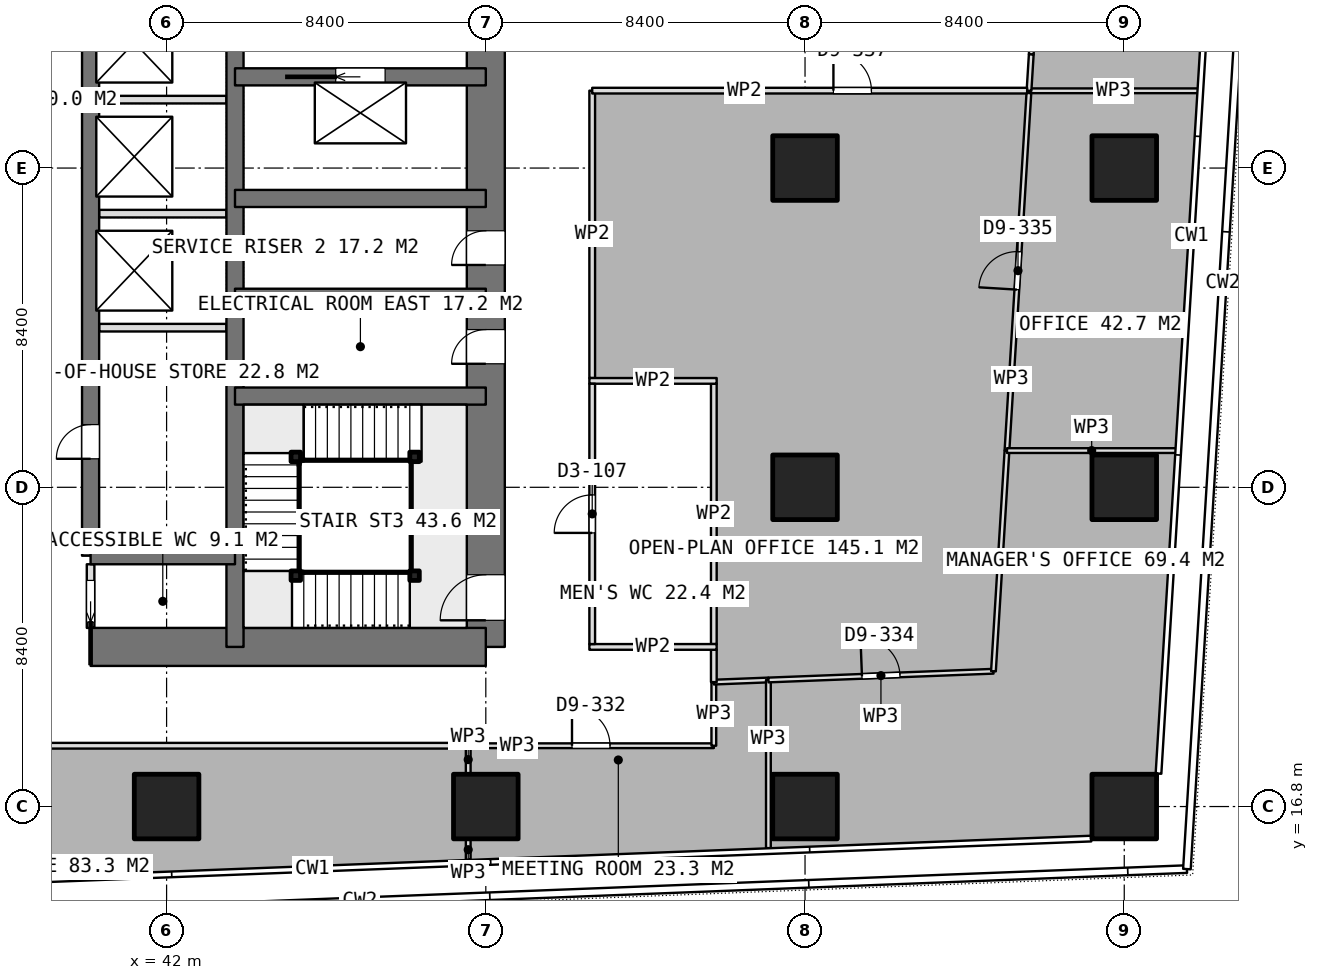
"""IFC4 building model, lengths in metres.
Left out: names, types, materials, properties, quantities, classifications, styles, units other than length and angle.
Written with IfcOpenShell. Run it as: python <this file> out.ifc"""

import sys

from ifc_helpers import new_model, si_unit, direction, frame, frame_2d, origin, origin_2d, place, context, subcontext, project, spatial, rectangle, extrude, element, fill, save


model = new_model("IFC4")
c1 = context("Model", 3, precision=1e-05, world=origin(), true_north=direction((0.0, 1.0)))
c2 = subcontext(c1, "Body", "Model", "MODEL_VIEW")
j1 = project(units=[si_unit("LENGTHUNIT", "METRE"), si_unit("PLANEANGLEUNIT", "RADIAN")], contexts=[c1])
p1 = place(None, origin())
s1 = spatial("IfcSite", under=j1, at=p1, CompositionType="ELEMENT")
p2 = place(p1, origin())
s2 = spatial("IfcBuilding", under=s1, at=p2, CompositionType="ELEMENT")
p3 = place(p2, frame((0.0, 0.0, 102.8)))
s3 = spatial("IfcBuildingStorey", under=s2, at=p3, CompositionType="ELEMENT", Elevation=102.8)
p4 = place(p3, frame((40.0, 21.0, 0.0), z_axis=(0.0, 0.0, 1.0), x_axis=(1.0, 0.0, 0.0)))
e1 = element("IfcWall", 1, at=p4, inside=s3, PredefinedType="SHEAR", context=c2, shape_type="SweptSolid", body=[
    extrude(rectangle(XDim=10.4, YDim=1.0, at=frame_2d((5.2, 0.0))), origin(), (0.0, 0.0, 1.0), 3.75),
])
p5 = place(p3, frame((50.4, 21.0, 0.0), z_axis=(0.0, 0.0, 1.0), x_axis=(0.0, 1.0, 0.0)))
e2 = element("IfcWall", 2, at=p5, inside=s3, PredefinedType="SHEAR", context=c2, shape_type="SweptSolid", body=[
    extrude(rectangle(XDim=25.2, YDim=1.0, at=frame_2d((12.6, 0.0))), origin(), (0.0, 0.0, 1.0), 3.75),
])
p6 = place(p5, frame((16.2, 0.0, 0.0)))
e3 = element("IfcOpeningElement", 3, at=p6, cuts=e2, PredefinedType="OPENING", context=c2, shape_type="SweptSolid", body=[
    extrude(rectangle(XDim=1.2, YDim=2.1, at=frame_2d((0.6, 1.05))), frame((0.0, 0.51, 0.0), z_axis=(0.0, -1.0, 0.0), x_axis=(1.0, 0.0, 0.0)), (0.0, 0.0, 1.0), 1.02),
])
p7 = place(p5, frame((10.05, 0.0, 0.0)))
e4 = element("IfcOpeningElement", 4, at=p7, cuts=e2, PredefinedType="OPENING", context=c2, shape_type="SweptSolid", body=[
    extrude(rectangle(XDim=0.9, YDim=2.1, at=frame_2d((0.45, 1.05))), frame((0.0, 0.51, 0.0), z_axis=(0.0, -1.0, 0.0), x_axis=(1.0, 0.0, 0.0)), (0.0, 0.0, 1.0), 1.02),
])
p8 = place(p5, frame((7.45, 0.0, 0.0)))
e5 = element("IfcOpeningElement", 5, at=p8, cuts=e2, PredefinedType="OPENING", context=c2, shape_type="SweptSolid", body=[
    extrude(rectangle(XDim=0.9, YDim=2.1, at=frame_2d((0.45, 1.05))), frame((0.0, 0.51, 0.0), z_axis=(0.0, -1.0, 0.0), x_axis=(1.0, 0.0, 0.0)), (0.0, 0.0, 1.0), 1.02),
])
p9 = place(p5, frame((0.7, 0.0, 0.0)))
e6 = element("IfcOpeningElement", 6, at=p9, cuts=e2, PredefinedType="OPENING", context=c2, shape_type="SweptSolid", body=[
    extrude(rectangle(XDim=1.2, YDim=2.1, at=frame_2d((0.6, 1.05))), frame((0.0, 0.51, 0.0), z_axis=(0.0, -1.0, 0.0), x_axis=(1.0, 0.0, 0.0)), (0.0, 0.0, 1.0), 1.02),
])
p10 = place(p3, frame((43.8, 21.0, 0.0), z_axis=(0.0, 0.0, 1.0), x_axis=(0.0, 1.0, 0.0)))
e7 = element("IfcWall", 7, at=p10, inside=s3, PredefinedType="SHEAR", context=c2, shape_type="SweptSolid", body=[
    extrude(rectangle(XDim=25.2, YDim=0.45, at=frame_2d((12.6, 0.0))), origin(), (0.0, 0.0, 1.0), 3.75),
])
p11 = place(p3, frame((40.0, 23.4, 0.0), z_axis=(0.0, 0.0, 1.0), x_axis=(0.0, 1.0, 0.0)))
e8 = element("IfcWall", 8, at=p11, inside=s3, PredefinedType="SHEAR", context=c2, shape_type="SweptSolid", body=[
    extrude(rectangle(XDim=18.0, YDim=0.45, at=frame_2d((9.0, 0.0))), origin(), (0.0, 0.0, 1.0), 3.75),
])
p12 = place(p11, frame((2.55, 0.0, 0.0)))
e9 = element("IfcOpeningElement", 9, at=p12, cuts=e8, PredefinedType="OPENING", context=c2, shape_type="SweptSolid", body=[
    extrude(rectangle(XDim=0.9, YDim=2.1, at=frame_2d((0.45, 1.05))), frame((0.0, 0.235, 0.0), z_axis=(0.0, -1.0, 0.0), x_axis=(1.0, 0.0, 0.0)), (0.0, 0.0, 1.0), 0.47),
])
p13 = place(p3, frame((40.0, 23.4, 0.0), z_axis=(0.0, 0.0, 1.0), x_axis=(1.0, 0.0, 0.0)))
e10 = element("IfcWall", 10, at=p13, inside=s3, PredefinedType="SHEAR", context=c2, shape_type="SweptSolid", body=[
    extrude(rectangle(XDim=3.8, YDim=0.45, at=frame_2d((1.9, 0.0))), origin(), (0.0, 0.0, 1.0), 3.75),
])
for number, where, z_axis, x_axis in (
    (11, (43.8, 27.6, 0.0), (0.0, 0.0, 1.0), (1.0, 0.0, 0.0)),
    (12, (43.8, 30.2, 0.0), (0.0, 0.0, 1.0), (1.0, 0.0, 0.0)),
    (13, (43.8, 32.8, 0.0), (0.0, 0.0, 1.0), (1.0, 0.0, 0.0)),
):
    element("IfcWall", number, at=place(p3, frame(where, z_axis=z_axis, x_axis=x_axis)), inside=s3, PredefinedType="SHEAR", context=c2, shape_type="SweptSolid", body=[
        extrude(rectangle(XDim=6.6, YDim=0.45, at=frame_2d((3.3, 0.0))), origin(), (0.0, 0.0, 1.0), 3.75),
    ])
p14 = place(p3, frame((43.8, 36.0, 0.0), z_axis=(0.0, 0.0, 1.0), x_axis=(1.0, 0.0, 0.0)))
e14 = element("IfcWall", 14, at=p14, inside=s3, PredefinedType="SHEAR", context=c2, shape_type="SweptSolid", body=[
    extrude(rectangle(XDim=6.6, YDim=0.45, at=frame_2d((3.3, 0.0))), origin(), (0.0, 0.0, 1.0), 3.75),
])
p15 = place(p14, frame((2.65, 0.0, 0.0)))
e15 = element("IfcOpeningElement", 15, at=p15, cuts=e14, PredefinedType="OPENING", context=c2, shape_type="SweptSolid", body=[
    extrude(rectangle(XDim=1.3, YDim=2.1, at=frame_2d((0.65, 1.05))), frame((0.0, 0.235, 0.0), z_axis=(0.0, -1.0, 0.0), x_axis=(1.0, 0.0, 0.0)), (0.0, 0.0, 1.0), 0.47),
])
for number, where, z_axis, x_axis in (
    (16, (42.0, 16.8, 0.0), (0.0, 0.0, 1.0), (1.0, 0.0, 0.0)),
    (17, (50.4, 16.8, 0.0), (0.0, 0.0, 1.0), (1.0, 0.0, 0.0)),
    (18, (58.8, 16.8, 0.0), (0.0, 0.0, 1.0), (1.0, 0.0, 0.0)),
    (19, (58.8, 25.2, 0.0), (0.0, 0.0, 1.0), (1.0, 0.0, 0.0)),
    (20, (58.8, 33.6, 0.0), (0.0, 0.0, 1.0), (1.0, 0.0, 0.0)),
    (21, (67.2, 16.8, 0.0), (0.0, 0.0, 1.0), (1.0, 0.0, 0.0)),
    (22, (67.2, 25.2, 0.0), (0.0, 0.0, 1.0), (1.0, 0.0, 0.0)),
    (23, (67.2, 33.6, 0.0), (0.0, 0.0, 1.0), (1.0, 0.0, 0.0)),
):
    element("IfcColumn", number, at=place(p3, frame(where, z_axis=z_axis, x_axis=x_axis)), inside=s3, PredefinedType="COLUMN", context=c2, shape_type="SweptSolid", body=[
        extrude(rectangle(XDim=1.7, YDim=1.7, at=origin_2d()), origin(), (0.0, 0.0, 1.0), 3.75),
    ])
for number, where, z_axis, x_axis in (
    (24, (40.225, 29.4, 0.0), (0.0, 0.0, 1.0), (1.0, 0.0, 0.0)),
    (25, (40.225, 32.4, 0.0), (0.0, 0.0, 1.0), (1.0, 0.0, 0.0)),
    (26, (40.225, 35.4, 0.0), (0.0, 0.0, 1.0), (1.0, 0.0, 0.0)),
):
    element("IfcWall", number, at=place(p3, frame(where, z_axis=z_axis, x_axis=x_axis)), inside=s3, PredefinedType="PARTITIONING", context=c2, shape_type="SweptSolid", body=[
        extrude(rectangle(XDim=3.35, YDim=0.2, at=frame_2d((1.675, 0.0))), origin(), (0.0, 0.0, 1.0), 3.5),
    ])
p16 = place(p3, frame((40.0, 21.5, 0.0), z_axis=(0.0, 0.0, 1.0), x_axis=(0.0, 1.0, 0.0)))
e27 = element("IfcWall", 27, at=p16, inside=s3, PredefinedType="PARTITIONING", context=c2, shape_type="SweptSolid", body=[
    extrude(rectangle(XDim=1.675, YDim=0.2, at=frame_2d((0.837, 0.0))), origin(), (0.0, 0.0, 1.0), 3.5),
])
p17 = place(p16, frame((0.15, 0.0, 0.0)))
e28 = element("IfcOpeningElement", 28, at=p17, cuts=e27, PredefinedType="OPENING", context=c2, shape_type="SweptSolid", body=[
    extrude(rectangle(XDim=1.1, YDim=2.1, at=frame_2d((0.55, 1.05))), frame((0.0, 0.11, 0.0), z_axis=(0.0, -1.0, 0.0), x_axis=(1.0, 0.0, 0.0)), (0.0, 0.0, 1.0), 0.22),
])
for number, where, z_axis, x_axis in (
    (29, (53.125, 21.0, 0.0), (0.0, 0.0, 1.0), (1.0, 0.0, 0.0)),
    (30, (53.125, 28.0, 0.0), (0.0, 0.0, 1.0), (1.0, 0.0, 0.0)),
):
    element("IfcWall", number, at=place(p3, frame(where, z_axis=z_axis, x_axis=x_axis)), inside=s3, PredefinedType="PARTITIONING", context=c2, shape_type="SweptSolid", body=[
        extrude(rectangle(XDim=3.35, YDim=0.15, at=frame_2d((1.675, 0.0))), origin(), (0.0, 0.0, 1.0), 3.5),
    ])
p18 = place(p3, frame((53.2, 21.075, 0.0), z_axis=(0.0, 0.0, 1.0), x_axis=(0.0, 1.0, 0.0)))
e31 = element("IfcWall", 31, at=p18, inside=s3, PredefinedType="PARTITIONING", context=c2, shape_type="SweptSolid", body=[
    extrude(rectangle(XDim=6.85, YDim=0.15, at=frame_2d((3.425, 0.0))), origin(), (0.0, 0.0, 1.0), 3.5),
])
p19 = place(p18, frame((2.925, 0.0, 0.0)))
e32 = element("IfcOpeningElement", 32, at=p19, cuts=e31, PredefinedType="OPENING", context=c2, shape_type="SweptSolid", body=[
    extrude(rectangle(XDim=1.0, YDim=2.1, at=frame_2d((0.5, 1.05))), frame((0.0, 0.085, 0.0), z_axis=(0.0, -1.0, 0.0), x_axis=(1.0, 0.0, 0.0)), (0.0, 0.0, 1.0), 0.17),
])
p20 = place(p3, frame((56.4, 21.075, 0.0), z_axis=(0.0, 0.0, 1.0), x_axis=(0.0, 1.0, 0.0)))
e33 = element("IfcWall", 33, at=p20, inside=s3, PredefinedType="PARTITIONING", context=c2, shape_type="SweptSolid", body=[
    extrude(rectangle(XDim=6.85, YDim=0.15, at=frame_2d((3.425, 0.0))), origin(), (0.0, 0.0, 1.0), 3.5),
])
p21 = place(p3, frame((49.937, 18.4, 0.0), z_axis=(0.0, 0.0, 1.0), x_axis=(1.0, 0.0, 0.0)))
e34 = element("IfcWall", 34, at=p21, inside=s3, PredefinedType="PARTITIONING", context=c2, shape_type="SweptSolid", body=[
    extrude(rectangle(XDim=6.463, YDim=0.125, at=frame_2d((3.231, 0.0))), origin(), (0.0, 0.0, 1.0), 3.5),
])
p22 = place(p21, frame((2.731, 0.0, 0.0)))
e35 = element("IfcOpeningElement", 35, at=p22, cuts=e34, PredefinedType="OPENING", context=c2, shape_type="SweptSolid", body=[
    extrude(rectangle(XDim=1.0, YDim=2.1, at=frame_2d((0.5, 1.05))), frame((0.0, 0.073, 0.0), z_axis=(0.0, -1.0, 0.0), x_axis=(1.0, 0.0, 0.0)), (0.0, 0.0, 1.0), 0.145),
])
p23 = place(p3, frame((56.4, 18.4, 0.0), z_axis=(0.0, 0.0, 1.0), x_axis=(0.0, 1.0, 0.0)))
e36 = element("IfcWall", 36, at=p23, inside=s3, PredefinedType="PARTITIONING", context=c2, shape_type="SweptSolid", body=[
    extrude(rectangle(XDim=1.674, YDim=0.125, at=frame_2d((0.837, 0.0))), origin(), (0.0, 0.0, 1.0), 3.5),
])
p24 = place(p3, frame((56.4, 20.074, 0.0), z_axis=(0.0, 0.0, 1.0), x_axis=(0.999242997058, 0.038902864047, 0.0)))
e37 = element("IfcWall", 37, at=p24, inside=s3, PredefinedType="PARTITIONING", context=c2, shape_type="SweptSolid", body=[
    extrude(rectangle(XDim=1.437, YDim=0.125, at=frame_2d((0.719, 0.0))), origin(), (0.0, 0.0, 1.0), 3.5),
])
p25 = place(p3, frame((57.836, 20.13, 0.0), z_axis=(0.0, 0.0, 1.0), x_axis=(0.0, -1.0, 0.0)))
e38 = element("IfcWall", 38, at=p25, inside=s3, PredefinedType="PARTITIONING", context=c2, shape_type="SweptSolid", body=[
    extrude(rectangle(XDim=4.424, YDim=0.125, at=frame_2d((2.212, 0.0))), origin(), (0.0, 0.0, 1.0), 3.5),
])
p26 = place(p3, frame((49.937, 15.399, 0.0), z_axis=(0.0, 0.0, 1.0), x_axis=(0.0, 1.0, 0.0)))
e39 = element("IfcWall", 39, at=p26, inside=s3, PredefinedType="PARTITIONING", context=c2, shape_type="SweptSolid", body=[
    extrude(rectangle(XDim=0.531, YDim=0.125, at=frame_2d((0.266, 0.0))), origin(), (0.0, 0.0, 1.0), 3.5),
])
p27 = place(p3, frame((49.937, 17.67, 0.0), z_axis=(0.0, 0.0, 1.0), x_axis=(0.0, 1.0, 0.0)))
e40 = element("IfcWall", 40, at=p27, inside=s3, PredefinedType="PARTITIONING", context=c2, shape_type="SweptSolid", body=[
    extrude(rectangle(XDim=0.73, YDim=0.125, at=frame_2d((0.365, 0.0))), origin(), (0.0, 0.0, 1.0), 3.5),
])
p28 = place(p3, frame((57.837, 20.13, 0.0), z_axis=(0.0, 0.0, 1.0), x_axis=(0.999244959279, 0.038852430487, 0.0)))
e41 = element("IfcWall", 41, at=p28, inside=s3, PredefinedType="PARTITIONING", context=c2, shape_type="SweptSolid", body=[
    extrude(rectangle(XDim=5.926, YDim=0.125, at=frame_2d((2.963, 0.0))), origin(), (0.0, 0.0, 1.0), 3.5),
])
p29 = place(p28, frame((2.463, 0.0, 0.0)))
e42 = element("IfcOpeningElement", 42, at=p29, cuts=e41, PredefinedType="OPENING", context=c2, shape_type="SweptSolid", body=[
    extrude(rectangle(XDim=1.0, YDim=2.1, at=frame_2d((0.5, 1.05))), frame((0.0, 0.073, 0.0), z_axis=(0.0, -1.0, 0.0), x_axis=(1.0, 0.0, 0.0)), (0.0, 0.0, 1.0), 0.145),
])
p30 = place(p3, frame((63.758, 20.36, 0.0), z_axis=(0.0, 0.0, 1.0), x_axis=(0.06119454608, 0.99812585756, 0.0)))
e43 = element("IfcWall", 43, at=p30, inside=s3, PredefinedType="PARTITIONING", context=c2, shape_type="SweptSolid", body=[
    extrude(rectangle(XDim=5.817, YDim=0.125, at=frame_2d((2.908, 0.0))), origin(), (0.0, 0.0, 1.0), 3.5),
])
p31 = place(p3, frame((64.114, 26.166, 0.0), z_axis=(0.0, 0.0, 1.0), x_axis=(1.0, 0.0, 0.0)))
e44 = element("IfcWall", 44, at=p31, inside=s3, PredefinedType="PARTITIONING", context=c2, shape_type="SweptSolid", body=[
    extrude(rectangle(XDim=4.458, YDim=0.125, at=frame_2d((2.229, 0.0))), origin(), (0.0, 0.0, 1.0), 3.5),
])
p32 = place(p3, frame((64.114, 26.167, 0.0), z_axis=(0.0, 0.0, 1.0), x_axis=(0.061165020441, 0.998127667322, 0.0)))
e45 = element("IfcWall", 45, at=p32, inside=s3, PredefinedType="PARTITIONING", context=c2, shape_type="SweptSolid", body=[
    extrude(rectangle(XDim=9.484, YDim=0.125, at=frame_2d((4.742, 0.0))), origin(), (0.0, 0.0, 1.0), 3.5),
])
p33 = place(p32, frame((4.242, 0.0, 0.0)))
e46 = element("IfcOpeningElement", 46, at=p33, cuts=e45, PredefinedType="OPENING", context=c2, shape_type="SweptSolid", body=[
    extrude(rectangle(XDim=1.0, YDim=2.1, at=frame_2d((0.5, 1.05))), frame((0.0, 0.073, 0.0), z_axis=(0.0, -1.0, 0.0), x_axis=(1.0, 0.0, 0.0)), (0.0, 0.0, 1.0), 0.145),
])
p34 = place(p3, frame((64.694, 35.633, 0.0), z_axis=(0.0, 0.0, 1.0), x_axis=(1.0, 0.0, 0.0)))
e47 = element("IfcWall", 47, at=p34, inside=s3, PredefinedType="PARTITIONING", context=c2, shape_type="SweptSolid", body=[
    extrude(rectangle(XDim=4.458, YDim=0.125, at=frame_2d((2.229, 0.0))), origin(), (0.0, 0.0, 1.0), 3.5),
])
p35 = place(p3, frame((64.753, 36.589, 0.0), z_axis=(0.0, 0.0, 1.0), x_axis=(0.061083835669, 0.998132638991, 0.0)))
e48 = element("IfcWall", 48, at=p35, inside=s3, PredefinedType="PARTITIONING", context=c2, shape_type="SweptSolid", body=[
    extrude(rectangle(XDim=6.435, YDim=0.125, at=frame_2d((3.217, 0.0))), origin(), (0.0, 0.0, 1.0), 3.5),
])
p36 = place(p35, frame((2.718, 0.0, 0.0)))
e49 = element("IfcOpeningElement", 49, at=p36, cuts=e48, PredefinedType="OPENING", context=c2, shape_type="SweptSolid", body=[
    extrude(rectangle(XDim=1.0, YDim=2.1, at=frame_2d((0.5, 1.05))), frame((0.0, 0.073, 0.0), z_axis=(0.0, -1.0, 0.0), x_axis=(1.0, 0.0, 0.0)), (0.0, 0.0, 1.0), 0.145),
])
p37 = place(p3, frame((64.694, 35.634, 0.0), z_axis=(0.0, 0.0, 1.0), x_axis=(0.061488745964, 0.998107776806, 0.0)))
e50 = element("IfcWall", 50, at=p37, inside=s3, PredefinedType="PARTITIONING", context=c2, shape_type="SweptSolid", body=[
    extrude(rectangle(XDim=0.957, YDim=0.125, at=frame_2d((0.479, 0.0))), origin(), (0.0, 0.0, 1.0), 3.5),
])
p38 = place(p3, frame((56.4, 20.074, 0.0), z_axis=(0.0, 0.0, 1.0), x_axis=(0.0, 1.0, 0.0)))
e51 = element("IfcWall", 51, at=p38, inside=s3, PredefinedType="PARTITIONING", context=c2, shape_type="SweptSolid", body=[
    extrude(rectangle(XDim=0.851, YDim=0.15, at=frame_2d((0.426, 0.0))), origin(), (0.0, 0.0, 1.0), 3.5),
])
p39 = place(p3, frame((53.2, 28.075, 0.0), z_axis=(0.0, 0.0, 1.0), x_axis=(0.0, 1.0, 0.0)))
e52 = element("IfcWall", 52, at=p39, inside=s3, PredefinedType="PARTITIONING", context=c2, shape_type="SweptSolid", body=[
    extrude(rectangle(XDim=7.562, YDim=0.15, at=frame_2d((3.781, 0.0))), origin(), (0.0, 0.0, 1.0), 3.5),
])
p40 = place(p3, frame((53.2, 35.637, 0.0), z_axis=(0.0, 0.0, 1.0), x_axis=(1.0, 0.0, 0.0)))
e53 = element("IfcWall", 53, at=p40, inside=s3, PredefinedType="PARTITIONING", context=c2, shape_type="SweptSolid", body=[
    extrude(rectangle(XDim=11.445, YDim=0.15, at=frame_2d((5.723, 0.0))), origin(), (0.0, 0.0, 1.0), 3.5),
])
p41 = place(p40, frame((6.347, 0.0, 0.0)))
e54 = element("IfcOpeningElement", 54, at=p41, cuts=e53, PredefinedType="OPENING", context=c2, shape_type="SweptSolid", body=[
    extrude(rectangle(XDim=1.0, YDim=2.1, at=frame_2d((0.5, 1.05))), frame((0.0, 0.085, 0.0), z_axis=(0.0, -1.0, 0.0), x_axis=(1.0, 0.0, 0.0)), (0.0, 0.0, 1.0), 0.17),
])
p42 = place(p3, frame((26.234, 18.4, 0.0), z_axis=(0.0, 0.0, 1.0), x_axis=(1.0, 0.0, 0.0)))
e55 = element("IfcWall", 55, at=p42, inside=s3, PredefinedType="PARTITIONING", context=c2, shape_type="SweptSolid", body=[
    extrude(rectangle(XDim=23.702, YDim=0.15, at=frame_2d((11.851, 0.0))), origin(), (0.0, 0.0, 1.0), 3.5),
])
p43 = place(p42, frame((11.351, 0.0, 0.0)))
e56 = element("IfcOpeningElement", 56, at=p43, cuts=e55, PredefinedType="OPENING", context=c2, shape_type="SweptSolid", body=[
    extrude(rectangle(XDim=1.0, YDim=2.1, at=frame_2d((0.5, 1.05))), frame((0.0, 0.085, 0.0), z_axis=(0.0, -1.0, 0.0), x_axis=(1.0, 0.0, 0.0)), (0.0, 0.0, 1.0), 0.17),
])
for number, where, z_axis, x_axis in (
    (57, (48.525, 22.875, 0.0), (0.0, 0.0, 1.0), (1.0, 0.0, 0.0)),
    (58, (45.4, 22.875, 0.0), (0.0, 0.0, 1.0), (1.0, 0.0, 0.0)),
    (59, (45.4, 26.0, 0.0), (0.0, 0.0, 1.0), (1.0, 0.0, 0.0)),
    (60, (48.525, 26.0, 0.0), (0.0, 0.0, 1.0), (1.0, 0.0, 0.0)),
):
    element("IfcColumn", number, at=place(p3, frame(where, z_axis=z_axis, x_axis=x_axis)), inside=s3, PredefinedType="COLUMN", context=c2, shape_type="SweptSolid", body=[
        extrude(rectangle(XDim=0.25, YDim=0.25, at=origin_2d()), origin(), (0.0, 0.0, 1.0), 3.75),
    ])
p44 = place(p7, origin())
e61 = element("IfcDoor", 61, at=p44, inside=s3, OperationType="SINGLE_SWING_LEFT", PredefinedType="DOOR", context=c2, shape_type="SweptSolid", body=[
    extrude(rectangle(XDim=0.9, YDim=2.1, at=frame_2d((0.45, 1.05))), frame((0.0, 0.025, 0.0), z_axis=(0.0, -1.0, 0.0), x_axis=(1.0, 0.0, 0.0)), (0.0, 0.0, 1.0), 0.05),
])
fill(e4, e61)
p45 = place(p8, origin())
e62 = element("IfcDoor", 62, at=p45, inside=s3, OperationType="SINGLE_SWING_LEFT", PredefinedType="DOOR", context=c2, shape_type="SweptSolid", body=[
    extrude(rectangle(XDim=0.9, YDim=2.1, at=frame_2d((0.45, 1.05))), frame((0.0, 0.025, 0.0), z_axis=(0.0, -1.0, 0.0), x_axis=(1.0, 0.0, 0.0)), (0.0, 0.0, 1.0), 0.05),
])
fill(e5, e62)
p46 = place(p17, origin())
e63 = element("IfcDoor", 63, at=p46, inside=s3, OperationType="SLIDING_TO_LEFT", PredefinedType="DOOR", context=c2, shape_type="SweptSolid", body=[
    extrude(rectangle(XDim=1.1, YDim=2.1, at=frame_2d((0.55, 1.05))), frame((0.0, 0.025, 0.0), z_axis=(0.0, -1.0, 0.0), x_axis=(1.0, 0.0, 0.0)), (0.0, 0.0, 1.0), 0.05),
])
fill(e28, e63)
p47 = place(p12, origin())
e64 = element("IfcDoor", 64, at=p47, inside=s3, OperationType="SINGLE_SWING_LEFT", PredefinedType="DOOR", context=c2, shape_type="SweptSolid", body=[
    extrude(rectangle(XDim=0.9, YDim=2.1, at=frame_2d((0.45, 1.05))), frame((0.0, 0.025, 0.0), z_axis=(0.0, -1.0, 0.0), x_axis=(1.0, 0.0, 0.0)), (0.0, 0.0, 1.0), 0.05),
])
fill(e9, e64)
p48 = place(p15, origin())
e65 = element("IfcDoor", 65, at=p48, inside=s3, OperationType="SLIDING_TO_LEFT", PredefinedType="USERDEFINED", context=c2, shape_type="SweptSolid", body=[
    extrude(rectangle(XDim=1.3, YDim=2.1, at=frame_2d((0.65, 1.05))), frame((0.0, 0.025, 0.0), z_axis=(0.0, -1.0, 0.0), x_axis=(1.0, 0.0, 0.0)), (0.0, 0.0, 1.0), 0.05),
])
fill(e15, e65)
p49 = place(p19, origin())
e66 = element("IfcDoor", 66, at=p49, inside=s3, OperationType="SINGLE_SWING_LEFT", PredefinedType="DOOR", context=c2, shape_type="SweptSolid", body=[
    extrude(rectangle(XDim=1.0, YDim=2.1, at=frame_2d((0.5, 1.05))), frame((0.0, 0.025, 0.0), z_axis=(0.0, -1.0, 0.0), x_axis=(1.0, 0.0, 0.0)), (0.0, 0.0, 1.0), 0.05),
])
fill(e32, e66)
p50 = place(p22, origin())
e67 = element("IfcDoor", 67, at=p50, inside=s3, OperationType="SINGLE_SWING_LEFT", PredefinedType="DOOR", context=c2, shape_type="SweptSolid", body=[
    extrude(rectangle(XDim=1.0, YDim=2.1, at=frame_2d((0.5, 1.05))), frame((0.0, 0.025, 0.0), z_axis=(0.0, -1.0, 0.0), x_axis=(1.0, 0.0, 0.0)), (0.0, 0.0, 1.0), 0.05),
])
fill(e35, e67)
p51 = place(p29, origin())
e68 = element("IfcDoor", 68, at=p51, inside=s3, OperationType="SINGLE_SWING_LEFT", PredefinedType="DOOR", context=c2, shape_type="SweptSolid", body=[
    extrude(rectangle(XDim=1.0, YDim=2.1, at=frame_2d((0.5, 1.05))), frame((0.0, 0.025, 0.0), z_axis=(0.0, -1.0, 0.0), x_axis=(1.0, 0.0, 0.0)), (0.0, 0.0, 1.0), 0.05),
])
fill(e42, e68)
p52 = place(p33, origin())
e69 = element("IfcDoor", 69, at=p52, inside=s3, OperationType="SINGLE_SWING_LEFT", PredefinedType="DOOR", context=c2, shape_type="SweptSolid", body=[
    extrude(rectangle(XDim=1.0, YDim=2.1, at=frame_2d((0.5, 1.05))), frame((0.0, 0.025, 0.0), z_axis=(0.0, -1.0, 0.0), x_axis=(1.0, 0.0, 0.0)), (0.0, 0.0, 1.0), 0.05),
])
fill(e46, e69)
p53 = place(p41, origin())
e70 = element("IfcDoor", 70, at=p53, inside=s3, OperationType="SINGLE_SWING_LEFT", PredefinedType="DOOR", context=c2, shape_type="SweptSolid", body=[
    extrude(rectangle(XDim=1.0, YDim=2.1, at=frame_2d((0.5, 1.05))), frame((0.0, 0.025, 0.0), z_axis=(0.0, -1.0, 0.0), x_axis=(1.0, 0.0, 0.0)), (0.0, 0.0, 1.0), 0.05),
])
fill(e54, e70)
p54 = place(p9, origin())
e71 = element("IfcDoor", 71, at=p54, inside=s3, OperationType="SINGLE_SWING_RIGHT", PredefinedType="DOOR", context=c2, shape_type="SweptSolid", body=[
    extrude(rectangle(XDim=1.2, YDim=2.1, at=frame_2d((0.6, 1.05))), frame((0.0, 0.025, 0.0), z_axis=(0.0, -1.0, 0.0), x_axis=(1.0, 0.0, 0.0)), (0.0, 0.0, 1.0), 0.05),
])
fill(e6, e71)
save(model, sys.argv[1])
